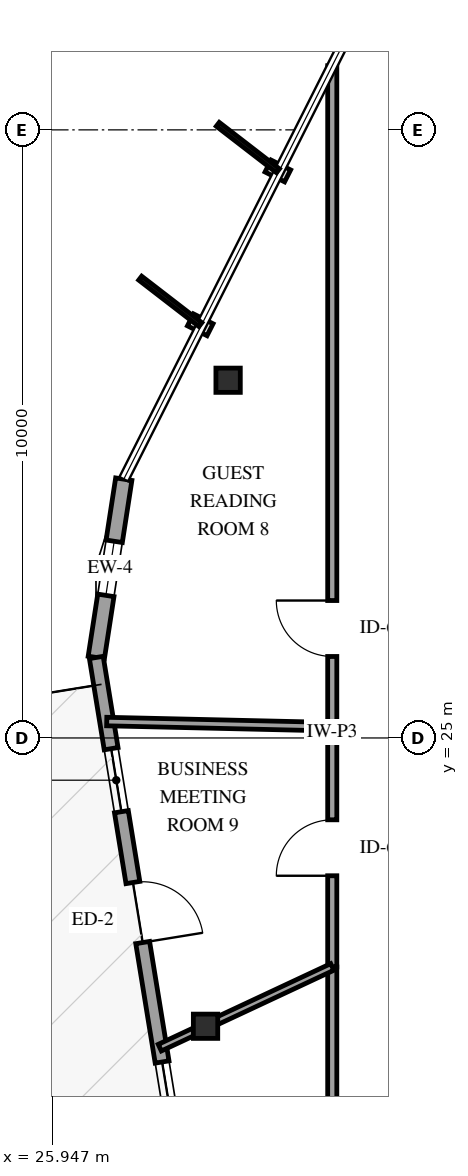
"""IFC4 building model, lengths in metres.
Left out: names, types, materials, properties, quantities, classifications, styles, units other than length and angle.
Written with IfcOpenShell. Run it as: python <this file> out.ifc"""

import sys

from ifc_helpers import new_model, si_unit, direction, frame, frame_2d, origin, origin_2d, place, context, subcontext, project, spatial, rectangle, i_section, extrude, element, fill, save


model = new_model("IFC4")
c1 = context("Model", 3, precision=1e-05, world=origin(), true_north=direction((0.0, 1.0)))
c2 = subcontext(c1, "Body", "Model", "MODEL_VIEW")
j1 = project(units=[si_unit("LENGTHUNIT", "METRE"), si_unit("PLANEANGLEUNIT", "RADIAN")], contexts=[c1])
p1 = place(None, origin())
s1 = spatial("IfcSite", under=j1, at=p1, CompositionType="ELEMENT")
p2 = place(p1, origin())
s2 = spatial("IfcBuilding", under=s1, at=p2, CompositionType="ELEMENT")
p3 = place(p2, frame((0.0, 0.0, 265.0)))
s3 = spatial("IfcBuildingStorey", under=s2, at=p3, CompositionType="ELEMENT", Elevation=265.0)
for number, where, z_axis, x_axis in (
    (1, (28.837, 30.883, 0.0), (0.0, 0.0, 1.0), (1.0, 0.0, 0.0)),
    (2, (28.466, 20.259, 0.0), (0.0, 0.0, 1.0), (1.0, 0.0, 0.0)),
):
    element("IfcColumn", number, at=place(p3, frame(where, z_axis=z_axis, x_axis=x_axis)), inside=s3, PredefinedType="COLUMN", context=c2, shape_type="SweptSolid", body=[
        extrude(i_section(OverallWidth=0.401, OverallDepth=0.399, WebThickness=0.025, FlangeThickness=0.04, FilletRadius=0.038, at=origin_2d()), origin(), (0.0, 0.0, 1.0), 3.75),
    ])
p4 = place(p3, frame((27.122, 29.256, 0.0), z_axis=(0.0, 0.0, 1.0), x_axis=(-0.152335472576, -0.988328843956, 0.0)))
e3 = element("IfcWall", 3, at=p4, inside=s3, PredefinedType="SOLIDWALL", context=c2, shape_type="SweptSolid", body=[
    extrude(rectangle(XDim=2.967, YDim=0.27, at=frame_2d((1.483, 0.0))), origin(), (0.0, 0.0, 1.0), 2.829),
])
p5 = place(p4, frame((1.033, 0.0, 0.75)))
e4 = element("IfcOpeningElement", 4, at=p5, cuts=e3, PredefinedType="OPENING", context=c2, shape_type="SweptSolid", body=[
    extrude(rectangle(XDim=0.9, YDim=1.5, at=frame_2d((0.45, 0.75))), frame((0.0, 0.145, 0.0), z_axis=(0.0, -1.0, 0.0), x_axis=(1.0, 0.0, 0.0)), (0.0, 0.0, 1.0), 0.29),
])
p6 = place(p3, frame((26.67, 26.324, 0.0), z_axis=(0.0, 0.0, 1.0), x_axis=(0.16056432401, -0.987025378526, 0.0)))
e5 = element("IfcWall", 5, at=p6, inside=s3, PredefinedType="SOLIDWALL", context=c2, shape_type="SweptSolid", body=[
    extrude(rectangle(XDim=8.5, YDim=0.23, at=frame_2d((4.25, 0.0))), origin(), (0.0, 0.0, 1.0), 2.829),
])
p7 = place(p6, frame((3.75, 0.0, 0.0)))
e6 = element("IfcOpeningElement", 6, at=p7, cuts=e5, PredefinedType="OPENING", context=c2, shape_type="SweptSolid", body=[
    extrude(rectangle(XDim=1.0, YDim=2.15, at=frame_2d((0.5, 1.075))), frame((0.0, 0.125, 0.0), z_axis=(0.0, -1.0, 0.0), x_axis=(1.0, 0.0, 0.0)), (0.0, 0.0, 1.0), 0.25),
])
p8 = place(p6, frame((1.52, 0.0, 0.72)))
e7 = element("IfcOpeningElement", 7, at=p8, cuts=e5, PredefinedType="OPENING", context=c2, shape_type="SweptSolid", body=[
    extrude(rectangle(XDim=1.05, YDim=1.55, at=frame_2d((0.525, 0.775))), frame((0.0, 0.125, 0.0), z_axis=(0.0, -1.0, 0.0), x_axis=(1.0, 0.0, 0.0)), (0.0, 0.0, 1.0), 0.25),
])
p9 = place(p6, frame((6.74, 0.0, 0.72)))
e8 = element("IfcOpeningElement", 8, at=p9, cuts=e5, PredefinedType="OPENING", context=c2, shape_type="SweptSolid", body=[
    extrude(rectangle(XDim=1.05, YDim=1.55, at=frame_2d((0.525, 0.775))), frame((0.0, 0.125, 0.0), z_axis=(0.0, -1.0, 0.0), x_axis=(1.0, 0.0, 0.0)), (0.0, 0.0, 1.0), 0.25),
])
p10 = place(p3, frame((30.55, 25.185, 0.0), z_axis=(0.0, 0.0, 1.0), x_axis=(0.0, 1.0, 0.0)))
e9 = element("IfcWall", 9, at=p10, inside=s3, PredefinedType="PARTITIONING", context=c2, shape_type="SweptSolid", body=[
    extrude(rectangle(XDim=10.87, YDim=0.15, at=frame_2d((5.435, 0.0))), origin(), (0.0, 0.0, 1.0), 3.45),
])
p11 = place(p10, frame((1.155, 0.0, 0.0)))
e10 = element("IfcOpeningElement", 10, at=p11, cuts=e9, PredefinedType="OPENING", context=c2, shape_type="SweptSolid", body=[
    extrude(rectangle(XDim=0.92, YDim=2.12, at=frame_2d((0.46, 1.06))), frame((0.0, 0.085, 0.0), z_axis=(0.0, -1.0, 0.0), x_axis=(1.0, 0.0, 0.0)), (0.0, 0.0, 1.0), 0.17),
])
p12 = place(p3, frame((30.55, 14.149, 0.0), z_axis=(0.0, 0.0, 1.0), x_axis=(0.0, 1.0, 0.0)))
e11 = element("IfcWall", 11, at=p12, inside=s3, PredefinedType="PARTITIONING", context=c2, shape_type="SweptSolid", body=[
    extrude(rectangle(XDim=7.085, YDim=0.15, at=frame_2d((3.542, 0.0))), origin(), (0.0, 0.0, 1.0), 3.45),
])
p13 = place(p12, frame((3.068, 0.0, 0.0)))
e12 = element("IfcOpeningElement", 12, at=p13, cuts=e11, PredefinedType="OPENING", context=c2, shape_type="SweptSolid", body=[
    extrude(rectangle(XDim=0.92, YDim=2.12, at=frame_2d((0.46, 1.06))), frame((0.0, 0.085, 0.0), z_axis=(0.0, -1.0, 0.0), x_axis=(1.0, 0.0, 0.0)), (0.0, 0.0, 1.0), 0.17),
])
p14 = place(p3, frame((30.55, 21.234, 0.0), z_axis=(0.0, 0.0, 1.0), x_axis=(0.0, 1.0, 0.0)))
e13 = element("IfcWall", 13, at=p14, inside=s3, PredefinedType="PARTITIONING", context=c2, shape_type="SweptSolid", body=[
    extrude(rectangle(XDim=3.951, YDim=0.15, at=frame_2d((1.976, 0.0))), origin(), (0.0, 0.0, 1.0), 3.45),
])
p15 = place(p14, frame((1.5, 0.0, 0.0)))
e14 = element("IfcOpeningElement", 14, at=p15, cuts=e13, PredefinedType="OPENING", context=c2, shape_type="SweptSolid", body=[
    extrude(rectangle(XDim=0.92, YDim=2.12, at=frame_2d((0.46, 1.06))), frame((0.0, 0.085, 0.0), z_axis=(0.0, -1.0, 0.0), x_axis=(1.0, 0.0, 0.0)), (0.0, 0.0, 1.0), 0.17),
])
p16 = place(p3, frame((30.55, 25.185, 0.0), z_axis=(0.0, 0.0, 1.0), x_axis=(-0.999737742621, 0.022900785573, 0.0)))
e15 = element("IfcWall", 15, at=p16, inside=s3, PredefinedType="PARTITIONING", context=c2, shape_type="SweptSolid", body=[
    extrude(rectangle(XDim=3.71, YDim=0.14, at=frame_2d((1.855, 0.0))), origin(), (0.0, 0.0, 1.0), 3.45),
])
p17 = place(p3, frame((30.55, 21.234, 0.0), z_axis=(0.0, 0.0, 1.0), x_axis=(-0.905758374269, -0.423794487272, 0.0)))
e16 = element("IfcWall", 16, at=p17, inside=s3, PredefinedType="PARTITIONING", context=c2, shape_type="SweptSolid", body=[
    extrude(rectangle(XDim=3.131, YDim=0.12, at=frame_2d((1.565, 0.0))), origin(), (0.0, 0.0, 1.0), 3.45),
])
p18 = place(p5, origin())
e17 = element("IfcWindow", 17, at=p18, inside=s3, PartitioningType="SINGLE_PANEL", PredefinedType="WINDOW", context=c2, shape_type="SweptSolid", body=[
    extrude(rectangle(XDim=0.9, YDim=1.5, at=frame_2d((0.45, 0.75))), frame((0.0, 0.03, 0.0), z_axis=(0.0, -1.0, 0.0), x_axis=(1.0, 0.0, 0.0)), (0.0, 0.0, 1.0), 0.06),
])
fill(e4, e17)
p19 = place(p7, origin())
e18 = element("IfcDoor", 18, at=p19, inside=s3, OperationType="SINGLE_SWING_RIGHT", PredefinedType="DOOR", context=c2, shape_type="SweptSolid", body=[
    extrude(rectangle(XDim=1.0, YDim=2.15, at=frame_2d((0.5, 1.075))), frame((0.0, 0.025, 0.0), z_axis=(0.0, -1.0, 0.0), x_axis=(1.0, 0.0, 0.0)), (0.0, 0.0, 1.0), 0.05),
])
fill(e6, e18)
p20 = place(p8, origin())
e19 = element("IfcWindow", 19, at=p20, inside=s3, PartitioningType="SINGLE_PANEL", PredefinedType="WINDOW", context=c2, shape_type="SweptSolid", body=[
    extrude(rectangle(XDim=1.05, YDim=1.55, at=frame_2d((0.525, 0.775))), frame((0.0, 0.03, 0.0), z_axis=(0.0, -1.0, 0.0), x_axis=(1.0, 0.0, 0.0)), (0.0, 0.0, 1.0), 0.06),
])
fill(e7, e19)
p21 = place(p9, origin())
e20 = element("IfcWindow", 20, at=p21, inside=s3, PartitioningType="SINGLE_PANEL", PredefinedType="WINDOW", context=c2, shape_type="SweptSolid", body=[
    extrude(rectangle(XDim=1.05, YDim=1.55, at=frame_2d((0.525, 0.775))), frame((0.0, 0.03, 0.0), z_axis=(0.0, -1.0, 0.0), x_axis=(1.0, 0.0, 0.0)), (0.0, 0.0, 1.0), 0.06),
])
fill(e8, e20)
p22 = place(p11, origin())
e21 = element("IfcDoor", 21, at=p22, inside=s3, OperationType="SINGLE_SWING_RIGHT", PredefinedType="DOOR", context=c2, shape_type="SweptSolid", body=[
    extrude(rectangle(XDim=0.92, YDim=2.12, at=frame_2d((0.46, 1.06))), frame((0.0, 0.025, 0.0), z_axis=(0.0, -1.0, 0.0), x_axis=(1.0, 0.0, 0.0)), (0.0, 0.0, 1.0), 0.05),
])
fill(e10, e21)
p23 = place(p15, origin())
e22 = element("IfcDoor", 22, at=p23, inside=s3, OperationType="SINGLE_SWING_LEFT", PredefinedType="DOOR", context=c2, shape_type="SweptSolid", body=[
    extrude(rectangle(XDim=0.92, YDim=2.12, at=frame_2d((0.46, 1.06))), frame((0.0, 0.025, 0.0), z_axis=(0.0, -1.0, 0.0), x_axis=(1.0, 0.0, 0.0)), (0.0, 0.0, 1.0), 0.05),
])
fill(e14, e22)
save(model, sys.argv[1])
